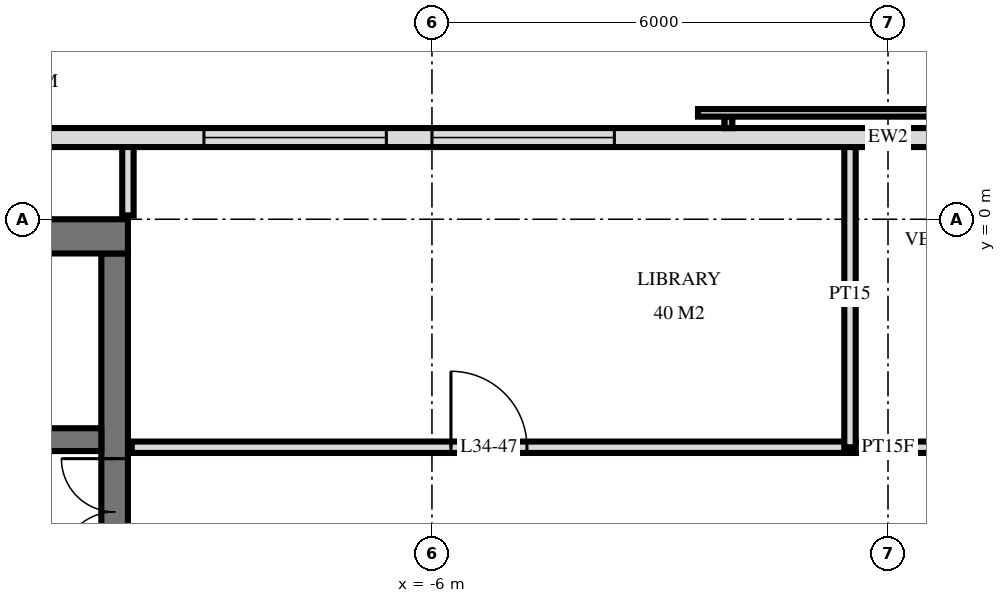
"""IFC4 building model, lengths in metres.
Left out: names, types, materials, properties, quantities, classifications, styles, units other than length and angle.
Written with IfcOpenShell. Run it as: python <this file> out.ifc"""

import sys

from ifc_helpers import new_model, si_unit, direction, frame, frame_2d, origin, place, context, subcontext, project, spatial, rectangle, extrude, element, fill, save


model = new_model("IFC4")
c1 = context("Model", 3, precision=1e-05, world=origin(), true_north=direction((0.0, 1.0)))
c2 = subcontext(c1, "Body", "Model", "MODEL_VIEW")
j1 = project(units=[si_unit("LENGTHUNIT", "METRE"), si_unit("PLANEANGLEUNIT", "RADIAN")], contexts=[c1])
p1 = place(None, origin())
s1 = spatial("IfcSite", under=j1, at=p1, CompositionType="ELEMENT")
p2 = place(p1, origin())
s2 = spatial("IfcBuilding", under=s1, at=p2, CompositionType="ELEMENT")
p3 = place(p2, frame((0.0, 0.0, 134.4)))
s3 = spatial("IfcBuildingStorey", under=s2, at=p3, CompositionType="ELEMENT", Elevation=134.4)
p4 = place(p3, frame((-24.5, -0.225, 0.0), z_axis=(0.0, 0.0, 1.0), x_axis=(1.0, 0.0, 0.0)))
e1 = element("IfcWall", 1, at=p4, inside=s3, PredefinedType="SHEAR", context=c2, shape_type="SweptSolid", body=[
    extrude(rectangle(XDim=14.5, YDim=0.45, at=frame_2d((7.25, 0.0))), origin(), (0.0, 0.0, 1.0), 3.6),
])
p5 = place(p3, frame((-10.175, -14.55, 0.0), z_axis=(0.0, 0.0, 1.0), x_axis=(0.0, 1.0, 0.0)))
e2 = element("IfcWall", 2, at=p5, inside=s3, PredefinedType="SHEAR", context=c2, shape_type="SweptSolid", body=[
    extrude(rectangle(XDim=14.1, YDim=0.35, at=frame_2d((7.05, 0.0))), origin(), (0.0, 0.0, 1.0), 3.6),
])
p6 = place(p5, frame((8.4, 0.0, 0.0)))
e3 = element("IfcOpeningElement", 3, at=p6, cuts=e2, PredefinedType="OPENING", context=c2, shape_type="SweptSolid", body=[
    extrude(rectangle(XDim=1.4, YDim=2.4, at=frame_2d((0.7, 1.2))), frame((0.0, 0.185, 0.0), z_axis=(0.0, -1.0, 0.0), x_axis=(1.0, 0.0, 0.0)), (0.0, 0.0, 1.0), 0.37),
])
p7 = place(p5, frame((10.0, 0.0, 0.0)))
e4 = element("IfcOpeningElement", 4, at=p7, cuts=e2, PredefinedType="OPENING", context=c2, shape_type="SweptSolid", body=[
    extrude(rectangle(XDim=1.4, YDim=2.4, at=frame_2d((0.7, 1.2))), frame((0.0, 0.185, 0.0), z_axis=(0.0, -1.0, 0.0), x_axis=(1.0, 0.0, 0.0)), (0.0, 0.0, 1.0), 0.37),
])
p8 = place(p5, frame((4.0, 0.0, 0.0)))
e5 = element("IfcOpeningElement", 5, at=p8, cuts=e2, PredefinedType="OPENING", context=c2, shape_type="SweptSolid", body=[
    extrude(rectangle(XDim=1.2, YDim=2.1, at=frame_2d((0.6, 1.05))), frame((0.0, 0.185, 0.0), z_axis=(0.0, -1.0, 0.0), x_axis=(1.0, 0.0, 0.0)), (0.0, 0.0, 1.0), 0.37),
])
p9 = place(p3, frame((-24.05, -2.9, 0.0), z_axis=(0.0, 0.0, 1.0), x_axis=(1.0, 0.0, 0.0)))
e6 = element("IfcWall", 6, at=p9, inside=s3, PredefinedType="SHEAR", context=c2, shape_type="SweptSolid", body=[
    extrude(rectangle(XDim=13.7, YDim=0.3, at=frame_2d((6.85, 0.0))), origin(), (0.0, 0.0, 1.0), 3.6),
])
p10 = place(p9, frame((0.55, 0.0, 0.0)))
e7 = element("IfcOpeningElement", 7, at=p10, cuts=e6, PredefinedType="OPENING", context=c2, shape_type="SweptSolid", body=[
    extrude(rectangle(XDim=1.1, YDim=2.1, at=frame_2d((0.55, 1.05))), frame((0.0, 0.16, 0.0), z_axis=(0.0, -1.0, 0.0), x_axis=(1.0, 0.0, 0.0)), (0.0, 0.0, 1.0), 0.32),
])
p11 = place(p9, frame((5.9, 0.0, 0.0)))
e8 = element("IfcOpeningElement", 8, at=p11, cuts=e6, PredefinedType="OPENING", context=c2, shape_type="SweptSolid", body=[
    extrude(rectangle(XDim=0.9, YDim=2.1, at=frame_2d((0.45, 1.05))), frame((0.0, 0.16, 0.0), z_axis=(0.0, -1.0, 0.0), x_axis=(1.0, 0.0, 0.0)), (0.0, 0.0, 1.0), 0.32),
])
p12 = place(p9, frame((11.85, 0.0, 0.0)))
e9 = element("IfcOpeningElement", 9, at=p12, cuts=e6, PredefinedType="OPENING", context=c2, shape_type="SweptSolid", body=[
    extrude(rectangle(XDim=1.0, YDim=2.1, at=frame_2d((0.5, 1.05))), frame((0.0, 0.16, 0.0), z_axis=(0.0, -1.0, 0.0), x_axis=(1.0, 0.0, 0.0)), (0.0, 0.0, 1.0), 0.32),
])
p13 = place(p9, frame((9.312, 0.0, 0.0)))
e10 = element("IfcOpeningElement", 10, at=p13, cuts=e6, PredefinedType="OPENING", context=c2, shape_type="SweptSolid", body=[
    extrude(rectangle(XDim=1.0, YDim=2.1, at=frame_2d((0.5, 1.05))), frame((0.0, 0.16, 0.0), z_axis=(0.0, -1.0, 0.0), x_axis=(1.0, 0.0, 0.0)), (0.0, 0.0, 1.0), 0.32),
])
p14 = place(p9, frame((7.887, 0.0, 0.0)))
e11 = element("IfcOpeningElement", 11, at=p14, cuts=e6, PredefinedType="OPENING", context=c2, shape_type="SweptSolid", body=[
    extrude(rectangle(XDim=1.0, YDim=2.1, at=frame_2d((0.5, 1.05))), frame((0.0, 0.16, 0.0), z_axis=(0.0, -1.0, 0.0), x_axis=(1.0, 0.0, 0.0)), (0.0, 0.0, 1.0), 0.32),
])
p15 = place(p9, frame((3.0, 0.0, 0.0)))
e12 = element("IfcOpeningElement", 12, at=p15, cuts=e6, PredefinedType="OPENING", context=c2, shape_type="SweptSolid", body=[
    extrude(rectangle(XDim=1.0, YDim=2.1, at=frame_2d((0.5, 1.05))), frame((0.0, 0.16, 0.0), z_axis=(0.0, -1.0, 0.0), x_axis=(1.0, 0.0, 0.0)), (0.0, 0.0, 1.0), 0.32),
])
p16 = place(p3, frame((23.675, 1.075, 0.0), z_axis=(0.0, 0.0, 1.0), x_axis=(-1.0, 0.0, 0.0)))
e13 = element("IfcWall", 13, at=p16, inside=s3, PredefinedType="SOLIDWALL", context=c2, shape_type="SweptSolid", body=[
    extrude(rectangle(XDim=47.351, YDim=0.25, at=frame_2d((23.675, 0.0))), origin(), (0.0, 0.0, 1.0), 3.32),
])
p17 = place(p16, frame((27.275, 0.0, 0.3)))
e14 = element("IfcOpeningElement", 14, at=p17, cuts=e13, PredefinedType="OPENING", context=c2, shape_type="SweptSolid", body=[
    extrude(rectangle(XDim=2.4, YDim=2.1, at=frame_2d((1.2, 1.05))), frame((0.0, 0.135, 0.0), z_axis=(0.0, -1.0, 0.0), x_axis=(1.0, 0.0, 0.0)), (0.0, 0.0, 1.0), 0.27),
])
p18 = place(p16, frame((30.275, 0.0, 0.3)))
e15 = element("IfcOpeningElement", 15, at=p18, cuts=e13, PredefinedType="OPENING", context=c2, shape_type="SweptSolid", body=[
    extrude(rectangle(XDim=2.4, YDim=2.1, at=frame_2d((1.2, 1.05))), frame((0.0, 0.135, 0.0), z_axis=(0.0, -1.0, 0.0), x_axis=(1.0, 0.0, 0.0)), (0.0, 0.0, 1.0), 0.27),
])
p19 = place(p3, frame((-0.5, -3.0, 0.0), z_axis=(0.0, 0.0, 1.0), x_axis=(0.0, 1.0, 0.0)))
e16 = element("IfcWall", 16, at=p19, inside=s3, PredefinedType="PARTITIONING", context=c2, shape_type="SweptSolid", body=[
    extrude(rectangle(XDim=4.02, YDim=0.15, at=frame_2d((2.01, 0.0))), origin(), (0.0, 0.0, 1.0), 3.32),
])
p20 = place(p3, frame((-10.0, 0.05, 0.0), z_axis=(0.0, 0.0, 1.0), x_axis=(0.0, 1.0, 0.0)))
e17 = element("IfcWall", 17, at=p20, inside=s3, PredefinedType="PARTITIONING", context=c2, shape_type="SweptSolid", body=[
    extrude(rectangle(XDim=0.97, YDim=0.15, at=frame_2d((0.485, 0.0))), origin(), (0.0, 0.0, 1.0), 3.32),
])
p21 = place(p3, frame((-9.95, -3.0, 0.0), z_axis=(0.0, 0.0, 1.0), x_axis=(1.0, 0.0, 0.0)))
e18 = element("IfcWall", 18, at=p21, inside=s3, PredefinedType="PARTITIONING", context=c2, shape_type="SweptSolid", body=[
    extrude(rectangle(XDim=19.9, YDim=0.15, at=frame_2d((9.95, 0.0))), origin(), (0.0, 0.0, 1.0), 3.32),
])
p22 = place(p21, frame((4.2, 0.0, 0.0)))
e19 = element("IfcOpeningElement", 19, at=p22, cuts=e18, PredefinedType="OPENING", context=c2, shape_type="SweptSolid", body=[
    extrude(rectangle(XDim=1.0, YDim=2.1, at=frame_2d((0.5, 1.05))), frame((0.0, 0.085, 0.0), z_axis=(0.0, -1.0, 0.0), x_axis=(1.0, 0.0, 0.0)), (0.0, 0.0, 1.0), 0.17),
])
p23 = place(p21, frame((11.45, 0.0, 0.0)))
e20 = element("IfcOpeningElement", 20, at=p23, cuts=e18, PredefinedType="OPENING", context=c2, shape_type="SweptSolid", body=[
    extrude(rectangle(XDim=1.0, YDim=2.1, at=frame_2d((0.5, 1.05))), frame((0.0, 0.085, 0.0), z_axis=(0.0, -1.0, 0.0), x_axis=(1.0, 0.0, 0.0)), (0.0, 0.0, 1.0), 0.17),
])
p24 = place(p21, frame((15.45, 0.0, 0.0)))
e21 = element("IfcOpeningElement", 21, at=p24, cuts=e18, PredefinedType="OPENING", context=c2, shape_type="SweptSolid", body=[
    extrude(rectangle(XDim=1.0, YDim=2.1, at=frame_2d((0.5, 1.05))), frame((0.0, 0.085, 0.0), z_axis=(0.0, -1.0, 0.0), x_axis=(1.0, 0.0, 0.0)), (0.0, 0.0, 1.0), 0.17),
])
p25 = place(p21, frame((18.2, 0.0, 0.0)))
e22 = element("IfcOpeningElement", 22, at=p25, cuts=e18, PredefinedType="OPENING", context=c2, shape_type="SweptSolid", body=[
    extrude(rectangle(XDim=1.0, YDim=2.1, at=frame_2d((0.5, 1.05))), frame((0.0, 0.085, 0.0), z_axis=(0.0, -1.0, 0.0), x_axis=(1.0, 0.0, 0.0)), (0.0, 0.0, 1.0), 0.17),
])
p26 = place(p17, origin())
e23 = element("IfcWindow", 23, at=p26, inside=s3, PartitioningType="SINGLE_PANEL", PredefinedType="WINDOW", context=c2, shape_type="SweptSolid", body=[
    extrude(rectangle(XDim=2.4, YDim=2.1, at=frame_2d((1.2, 1.05))), frame((0.0, 0.03, 0.0), z_axis=(0.0, -1.0, 0.0), x_axis=(1.0, 0.0, 0.0)), (0.0, 0.0, 1.0), 0.06),
])
fill(e14, e23)
p27 = place(p18, origin())
e24 = element("IfcWindow", 24, at=p27, inside=s3, PartitioningType="SINGLE_PANEL", PredefinedType="WINDOW", context=c2, shape_type="SweptSolid", body=[
    extrude(rectangle(XDim=2.4, YDim=2.1, at=frame_2d((1.2, 1.05))), frame((0.0, 0.03, 0.0), z_axis=(0.0, -1.0, 0.0), x_axis=(1.0, 0.0, 0.0)), (0.0, 0.0, 1.0), 0.06),
])
fill(e15, e24)
p28 = place(p7, origin())
e25 = element("IfcDoor", 25, at=p28, inside=s3, OperationType="DOUBLE_DOOR_SINGLE_SWING", PredefinedType="DOOR", context=c2, shape_type="SweptSolid", body=[
    extrude(rectangle(XDim=1.4, YDim=2.4, at=frame_2d((0.7, 1.2))), frame((0.0, 0.025, 0.0), z_axis=(0.0, -1.0, 0.0), x_axis=(1.0, 0.0, 0.0)), (0.0, 0.0, 1.0), 0.05),
])
fill(e4, e25)
p29 = place(p22, origin())
e26 = element("IfcDoor", 26, at=p29, inside=s3, OperationType="SINGLE_SWING_RIGHT", PredefinedType="DOOR", context=c2, shape_type="SweptSolid", body=[
    extrude(rectangle(XDim=1.0, YDim=2.1, at=frame_2d((0.5, 1.05))), frame((0.0, 0.025, 0.0), z_axis=(0.0, -1.0, 0.0), x_axis=(1.0, 0.0, 0.0)), (0.0, 0.0, 1.0), 0.05),
])
fill(e19, e26)
save(model, sys.argv[1])
